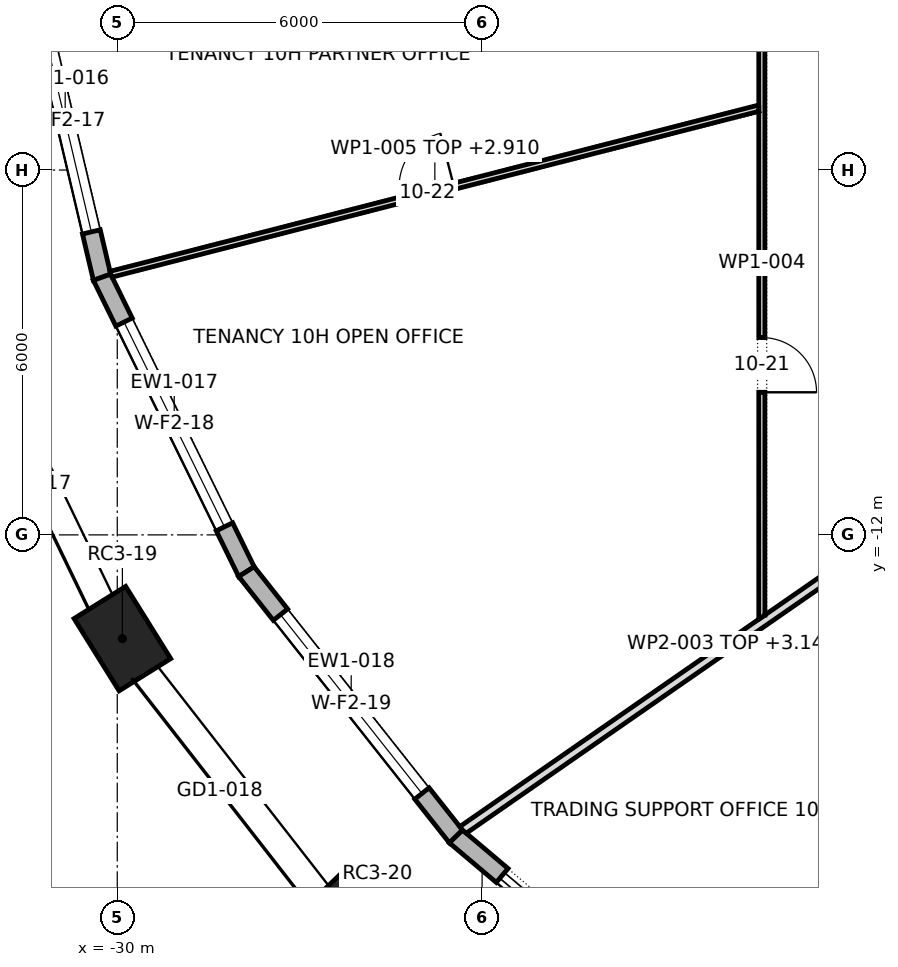
"""IFC4 building model, lengths in metres.
Left out: names, types, materials, properties, quantities, classifications, styles, units other than length and angle.
Written with IfcOpenShell. Run it as: python <this file> out.ifc"""

import sys

from ifc_helpers import new_model, si_unit, direction, frame, frame_2d, origin, origin_2d, place, context, subcontext, project, spatial, polyline, rectangle, outline, extrude, element, fill, save


model = new_model("IFC4")
c1 = context("Model", 3, precision=1e-05, world=origin(), true_north=direction((0.0, 1.0)))
c2 = subcontext(c1, "Body", "Model", "MODEL_VIEW")
j1 = project(units=[si_unit("LENGTHUNIT", "METRE"), si_unit("PLANEANGLEUNIT", "RADIAN")], contexts=[c1])
p1 = place(None, origin())
s1 = spatial("IfcSite", under=j1, at=p1, CompositionType="ELEMENT")
p2 = place(p1, origin())
s2 = spatial("IfcBuilding", under=s1, at=p2, CompositionType="ELEMENT")
p3 = place(p2, frame((0.0, 0.0, 150.7)))
s3 = spatial("IfcBuildingStorey", under=s2, at=p3, CompositionType="ELEMENT", Elevation=150.7)
for number, where, z_axis, x_axis in (
    (1, (-29.916, -13.706, 0.0), (0.0, 0.0, 1.0), (0.529, -0.849, 0.0)),
    (2, (-26.221, -18.445, 0.0), (0.0, 0.0, 1.0), (0.692, -0.722, 0.0)),
):
    element("IfcColumn", number, at=place(p3, frame(where, z_axis=z_axis, x_axis=x_axis)), inside=s3, PredefinedType="COLUMN", context=c2, shape_type="SweptSolid", body=[
        extrude(rectangle(XDim=1.4, YDim=1.0, at=origin_2d()), origin(), (0.0, 0.0, 1.0), 4.2),
    ])
p4 = place(p3, frame((-31.462, -2.622, 0.0), z_axis=(0.0, 0.0, 1.0), x_axis=(0.229289208312, -0.973358340464, 0.0)))
e3 = element("IfcWall", 3, at=p4, inside=s3, PredefinedType="STANDARD", context=c2, shape_type="SweptSolid", body=[
    extrude(outline(polyline([(-0.017, -0.15), (5.299, -0.15), (5.265, 0.15), (0.017, 0.15), (-0.017, -0.15)])), origin(), (0.0, 0.0, 1.0), 3.9),
])
p5 = place(p4, frame((0.766, 0.0, 0.6)))
e4 = element("IfcOpeningElement", 4, at=p5, cuts=e3, PredefinedType="OPENING", context=c2, shape_type="SweptSolid", body=[
    extrude(rectangle(XDim=3.75, YDim=2.85, at=frame_2d((1.875, 1.425))), frame((0.0, 0.162, 0.0), z_axis=(0.0, -1.0, 0.0), x_axis=(1.0, 0.0, 0.0)), (0.0, 0.0, 1.0), 0.324),
])
p6 = place(p3, frame((-30.25, -7.763, 0.0), z_axis=(0.0, 0.0, 1.0), x_axis=(0.440373354088, -0.897814740918, 0.0)))
e5 = element("IfcWall", 5, at=p6, inside=s3, PredefinedType="STANDARD", context=c2, shape_type="SweptSolid", body=[
    extrude(outline(polyline([(-0.017, -0.15), (5.409, -0.15), (5.376, 0.15), (0.017, 0.15), (-0.017, -0.15)])), origin(), (0.0, 0.0, 1.0), 3.9),
])
p7 = place(p6, frame((0.821, 0.0, 0.6)))
e6 = element("IfcOpeningElement", 6, at=p7, cuts=e5, PredefinedType="OPENING", context=c2, shape_type="SweptSolid", body=[
    extrude(rectangle(XDim=3.75, YDim=2.85, at=frame_2d((1.875, 1.425))), frame((0.0, 0.162, 0.0), z_axis=(0.0, -1.0, 0.0), x_axis=(1.0, 0.0, 0.0)), (0.0, 0.0, 1.0), 0.324),
])
p8 = place(p3, frame((-27.876, -12.605, 0.0), z_axis=(0.0, 0.0, 1.0), x_axis=(0.620520511988, -0.784190215574, 0.0)))
e7 = element("IfcWall", 7, at=p8, inside=s3, PredefinedType="STANDARD", context=c2, shape_type="SweptSolid", body=[
    extrude(outline(polyline([(-0.016, -0.15), (5.569, -0.15), (5.538, 0.15), (0.016, 0.15), (-0.016, -0.15)])), origin(), (0.0, 0.0, 1.0), 3.9),
])
p9 = place(p8, frame((0.902, 0.0, 0.6)))
e8 = element("IfcOpeningElement", 8, at=p9, cuts=e7, PredefinedType="OPENING", context=c2, shape_type="SweptSolid", body=[
    extrude(rectangle(XDim=3.75, YDim=2.85, at=frame_2d((1.875, 1.425))), frame((0.0, 0.162, 0.0), z_axis=(0.0, -1.0, 0.0), x_axis=(1.0, 0.0, 0.0)), (0.0, 0.0, 1.0), 0.324),
])
p10 = place(p3, frame((-24.43, -16.96, 0.0), z_axis=(0.0, 0.0, 1.0), x_axis=(0.764047627809, -0.64515984255, 0.0)))
e9 = element("IfcWall", 9, at=p10, inside=s3, PredefinedType="STANDARD", context=c2, shape_type="SweptSolid", body=[
    extrude(outline(polyline([(-0.015, -0.15), (5.752, -0.15), (5.723, 0.15), (0.015, 0.15), (-0.015, -0.15)])), origin(), (0.0, 0.0, 1.0), 3.9),
])
p11 = place(p10, frame((0.994, 0.0, 0.0)))
e10 = element("IfcOpeningElement", 10, at=p11, cuts=e9, PredefinedType="OPENING", context=c2, shape_type="SweptSolid", body=[
    extrude(rectangle(XDim=3.75, YDim=3.45, at=frame_2d((1.875, 1.725))), frame((0.0, 0.162, 0.0), z_axis=(0.0, -1.0, 0.0), x_axis=(1.0, 0.0, 0.0)), (0.0, 0.0, 1.0), 0.324),
])
p12 = place(p3, frame((-24.324, -16.859, 0.0), z_axis=(0.0, 0.0, 1.0), x_axis=(0.821700462415, 0.569919599652, 0.0)))
e11 = element("IfcWall", 11, at=p12, inside=s3, PredefinedType="PARTITIONING", context=c2, shape_type="SweptSolid", body=[
    extrude(outline(polyline([(0.025, -0.075), (1.807, -0.075), (3.589, -0.075), (5.371, -0.075), (7.153, -0.075), (8.935, -0.075), (10.717, -0.075), (10.82, 0.074), (10.82, 0.075), (9.249, 0.075), (7.677, 0.075), (6.105, 0.075), (6.104, 0.073), (6.102, 0.075), (4.576, 0.075), (3.051, 0.075), (1.525, 0.075), (0.0, 0.075), (0.0, 0.071), (0.004, 0.002), (0.025, -0.075)])), origin(), (0.0, 0.0, 1.0), 3.147),
])
p13 = place(p3, frame((-19.4, -13.387, 0.0), z_axis=(0.0, 0.0, 1.0), x_axis=(0.0, 1.0, 0.0)))
e12 = element("IfcWall", 12, at=p13, inside=s3, PredefinedType="PARTITIONING", context=c2, shape_type="SweptSolid", body=[
    extrude(outline(polyline([(11.703, -0.05), (11.703, -0.046), (11.695, 0.05), (10.028, 0.05), (8.361, 0.05), (8.354, 0.048), (8.353, 0.05), (6.682, 0.05), (5.012, 0.05), (3.341, 0.05), (1.671, 0.05), (0.0, 0.05), (0.0, 0.05), (0.069, -0.05), (2.008, -0.05), (3.947, -0.05), (5.886, -0.05), (7.825, -0.05), (9.764, -0.05), (11.703, -0.05)])), origin(), (0.0, 0.0, 1.0), 3.9),
])
p14 = place(p13, frame((3.732, 0.0, 0.0)))
e13 = element("IfcOpeningElement", 13, at=p14, cuts=e12, PredefinedType="OPENING", context=c2, shape_type="SweptSolid", body=[
    extrude(rectangle(XDim=0.9, YDim=2.1, at=frame_2d((0.45, 1.05))), frame((0.0, 0.062, 0.0), z_axis=(0.0, -1.0, 0.0), x_axis=(1.0, 0.0, 0.0)), (0.0, 0.0, 1.0), 0.124),
])
p15 = place(p3, frame((-19.438, -4.98, 0.0), z_axis=(0.0, 0.0, 1.0), x_axis=(-0.968675214927, -0.248331085419, 0.0)))
e14 = element("IfcWall", 14, at=p15, inside=s3, PredefinedType="PARTITIONING", context=c2, shape_type="SweptSolid", body=[
    extrude(outline(polyline([(11.014, -0.05), (11.014, 0.002), (11.004, 0.05), (9.174, 0.05), (7.344, 0.05), (5.515, 0.05), (3.685, 0.05), (1.855, 0.05), (0.025, 0.05), (0.0, -0.049), (0.0, -0.05), (1.836, -0.05), (3.671, -0.05), (5.507, -0.05), (7.343, -0.05), (9.178, -0.05), (11.014, -0.05)])), origin(), (0.0, 0.0, 1.0), 2.91),
])
p16 = place(p15, frame((5.189, 0.0, 0.0)))
e15 = element("IfcOpeningElement", 15, at=p16, cuts=e14, PredefinedType="OPENING", context=c2, shape_type="SweptSolid", body=[
    extrude(rectangle(XDim=0.9, YDim=2.1, at=frame_2d((0.45, 1.05))), frame((0.0, 0.062, 0.0), z_axis=(0.0, -1.0, 0.0), x_axis=(1.0, 0.0, 0.0)), (0.0, 0.0, 1.0), 0.124),
])
p17 = place(p5, origin())
e16 = element("IfcWindow", 16, at=p17, inside=s3, PartitioningType="TRIPLE_PANEL_VERTICAL", PredefinedType="WINDOW", context=c2, shape_type="SweptSolid", body=[
    extrude(rectangle(XDim=3.75, YDim=2.85, at=frame_2d((1.875, 1.425))), frame((0.0, 0.03, 0.0), z_axis=(0.0, -1.0, 0.0), x_axis=(1.0, 0.0, 0.0)), (0.0, 0.0, 1.0), 0.06),
])
fill(e4, e16)
p18 = place(p7, origin())
e17 = element("IfcWindow", 17, at=p18, inside=s3, PartitioningType="TRIPLE_PANEL_VERTICAL", PredefinedType="WINDOW", context=c2, shape_type="SweptSolid", body=[
    extrude(rectangle(XDim=3.75, YDim=2.85, at=frame_2d((1.875, 1.425))), frame((0.0, 0.03, 0.0), z_axis=(0.0, -1.0, 0.0), x_axis=(1.0, 0.0, 0.0)), (0.0, 0.0, 1.0), 0.06),
])
fill(e6, e17)
p19 = place(p9, origin())
e18 = element("IfcWindow", 18, at=p19, inside=s3, PartitioningType="TRIPLE_PANEL_VERTICAL", PredefinedType="WINDOW", context=c2, shape_type="SweptSolid", body=[
    extrude(rectangle(XDim=3.75, YDim=2.85, at=frame_2d((1.875, 1.425))), frame((0.0, 0.03, 0.0), z_axis=(0.0, -1.0, 0.0), x_axis=(1.0, 0.0, 0.0)), (0.0, 0.0, 1.0), 0.06),
])
fill(e8, e18)
p20 = place(p11, origin())
e19 = element("IfcDoor", 19, at=p20, inside=s3, OperationType="DOUBLE_DOOR_SLIDING", PredefinedType="DOOR", context=c2, shape_type="SweptSolid", body=[
    extrude(rectangle(XDim=3.75, YDim=3.45, at=frame_2d((1.875, 1.725))), frame((0.0, 0.025, 0.0), z_axis=(0.0, -1.0, 0.0), x_axis=(1.0, 0.0, 0.0)), (0.0, 0.0, 1.0), 0.05),
])
fill(e10, e19)
p21 = place(p14, frame((0.9, 0.0, 0.0), z_axis=(0.0, 0.0, 1.0), x_axis=(-1.0, 0.0, 0.0)))
e20 = element("IfcDoor", 20, at=p21, inside=s3, OperationType="SINGLE_SWING_LEFT", PredefinedType="DOOR", context=c2, shape_type="SweptSolid", body=[
    extrude(rectangle(XDim=0.9, YDim=2.1, at=frame_2d((0.45, 1.05))), frame((0.0, 0.025, 0.0), z_axis=(0.0, -1.0, 0.0), x_axis=(1.0, 0.0, 0.0)), (0.0, 0.0, 1.0), 0.05),
])
fill(e13, e20)
p22 = place(p16, frame((0.9, 0.0, 0.0), z_axis=(0.0, 0.0, 1.0), x_axis=(-1.0, 0.0, 0.0)))
e21 = element("IfcDoor", 21, at=p22, inside=s3, OperationType="SINGLE_SWING_LEFT", PredefinedType="DOOR", context=c2, shape_type="SweptSolid", body=[
    extrude(rectangle(XDim=0.9, YDim=2.1, at=frame_2d((0.45, 1.05))), frame((0.0, 0.025, 0.0), z_axis=(0.0, -1.0, 0.0), x_axis=(1.0, 0.0, 0.0)), (0.0, 0.0, 1.0), 0.05),
])
fill(e15, e21)
save(model, sys.argv[1])
